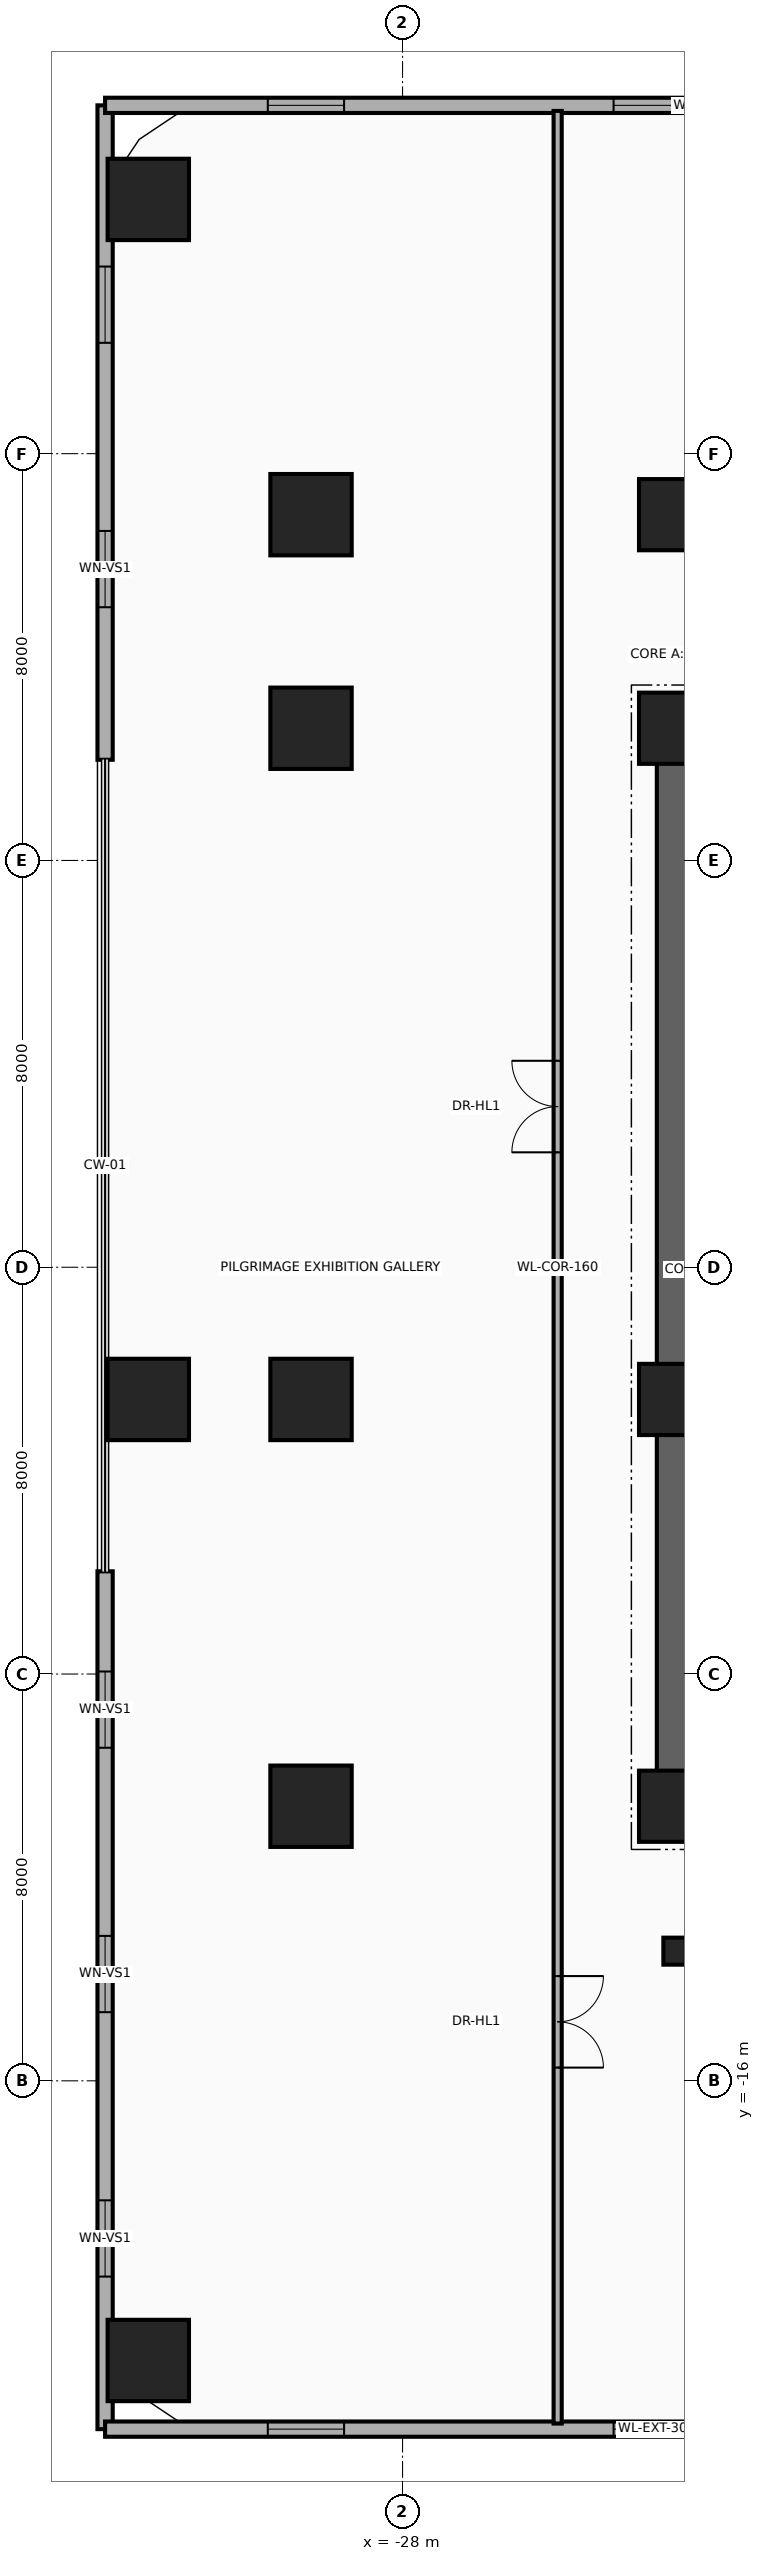
"""IFC4 building model, lengths in metres.
Left out: names, types, materials, properties, quantities, classifications, styles, units other than length and angle.
Written with IfcOpenShell. Run it as: python <this file> out.ifc"""

import sys

from ifc_helpers import new_model, si_unit, direction, frame, frame_2d, origin, origin_2d, place, context, subcontext, project, spatial, rectangle, i_section, extrude, source, transform, mapped, element, fill, save


model = new_model("IFC4")
c1 = context("Model", 3, precision=1e-05, world=origin(), true_north=direction((0.0, 1.0)))
c2 = subcontext(c1, "Body", "Model", "MODEL_VIEW")
j1 = project(units=[si_unit("LENGTHUNIT", "METRE"), si_unit("PLANEANGLEUNIT", "RADIAN")], contexts=[c1])
p1 = place(None, origin())
s1 = spatial("IfcSite", under=j1, at=p1, CompositionType="ELEMENT")
p2 = place(p1, origin())
s2 = spatial("IfcBuilding", under=s1, at=p2, CompositionType="ELEMENT")
p3 = place(p2, frame((0.0, 0.0, 15.6)))
s3 = spatial("IfcBuildingStorey", under=s2, at=p3, CompositionType="ELEMENT", Elevation=15.6)
p4 = place(p3, frame((-22.65, -11.15, 0.0), z_axis=(0.0, 0.0, 1.0), x_axis=(0.0, 1.0, 0.0)))
e1 = element("IfcWall", 1, at=p4, inside=s3, PredefinedType="SHEAR", context=c2, shape_type="SweptSolid", body=[
    extrude(rectangle(XDim=22.3, YDim=0.7, at=frame_2d((11.15, 0.0))), origin(), (0.0, 0.0, 1.0), 4.8),
])
for number, where, z_axis, x_axis in (
    (2, (-22.65, 10.8, 0.0), (0.0, 0.0, 1.0), (1.0, 0.0, 0.0)),
    (3, (-22.65, -10.8, 0.0), (0.0, 0.0, 1.0), (1.0, 0.0, 0.0)),
):
    element("IfcWall", number, at=place(p3, frame(where, z_axis=z_axis, x_axis=x_axis)), inside=s3, PredefinedType="SHEAR", context=c2, shape_type="SweptSolid", body=[
        extrude(rectangle(XDim=10.25, YDim=0.7, at=frame_2d((5.125, 0.0))), origin(), (0.0, 0.0, 1.0), 4.8),
    ])
m1 = source(origin(), c2, "Body", "SweptSolid", [
    extrude(rectangle(XDim=1.6, YDim=1.6, at=origin_2d()), origin(), (0.0, 0.0, 1.0), 5.2),
])
p5 = place(p3, frame((-29.8, -10.6, 0.0), z_axis=(0.0, 0.0, 1.0), x_axis=(1.0, 0.0, 0.0)))
e4 = element("IfcColumn", 4, at=p5, inside=s3, PredefinedType="COLUMN", context=c2, shape_type="MappedRepresentation", body=[
    mapped(m1, transform((0.0, 0.0, 0.0), x_axis=(1.0, 0.0, 0.0), y_axis=(0.0, 1.0, 0.0), z_axis=(0.0, 0.0, 1.0), scale=1.0)),
])
m2 = source(origin(), c2, "Body", "SweptSolid", [
    extrude(rectangle(XDim=1.4, YDim=1.4, at=origin_2d()), origin(), (0.0, 0.0, 1.0), 5.2),
])
p6 = place(p3, frame((-22.65, -10.6, 0.0), z_axis=(0.0, 0.0, 1.0), x_axis=(1.0, 0.0, 0.0)))
e5 = element("IfcColumn", 5, at=p6, inside=s3, PredefinedType="COLUMN", context=c2, shape_type="MappedRepresentation", body=[
    mapped(m2, transform((0.0, 0.0, 0.0), x_axis=(1.0, 0.0, 0.0), y_axis=(0.0, 1.0, 0.0), z_axis=(0.0, 0.0, 1.0), scale=1.0)),
])
p7 = place(p3, frame((-29.8, -2.6, 0.0), z_axis=(0.0, 0.0, 1.0), x_axis=(1.0, 0.0, 0.0)))
e6 = element("IfcColumn", 6, at=p7, inside=s3, PredefinedType="COLUMN", context=c2, shape_type="MappedRepresentation", body=[
    mapped(m1, transform((0.0, 0.0, 0.0), x_axis=(1.0, 0.0, 0.0), y_axis=(0.0, 1.0, 0.0), z_axis=(0.0, 0.0, 1.0), scale=1.0)),
])
p8 = place(p3, frame((-22.65, -2.6, 0.0), z_axis=(0.0, 0.0, 1.0), x_axis=(1.0, 0.0, 0.0)))
e7 = element("IfcColumn", 7, at=p8, inside=s3, PredefinedType="COLUMN", context=c2, shape_type="MappedRepresentation", body=[
    mapped(m2, transform((0.0, 0.0, 0.0), x_axis=(1.0, 0.0, 0.0), y_axis=(0.0, 1.0, 0.0), z_axis=(0.0, 0.0, 1.0), scale=1.0)),
])
p9 = place(p3, frame((-29.8, 10.6, 0.0), z_axis=(0.0, 0.0, 1.0), x_axis=(1.0, 0.0, 0.0)))
e8 = element("IfcColumn", 8, at=p9, inside=s3, PredefinedType="COLUMN", context=c2, shape_type="MappedRepresentation", body=[
    mapped(m1, transform((0.0, 0.0, 0.0), x_axis=(1.0, 0.0, 0.0), y_axis=(0.0, 1.0, 0.0), z_axis=(0.0, 0.0, 1.0), scale=1.0)),
])
p10 = place(p3, frame((-22.65, 10.6, 0.0), z_axis=(0.0, 0.0, 1.0), x_axis=(1.0, 0.0, 0.0)))
e9 = element("IfcColumn", 9, at=p10, inside=s3, PredefinedType="COLUMN", context=c2, shape_type="MappedRepresentation", body=[
    mapped(m2, transform((0.0, 0.0, 0.0), x_axis=(1.0, 0.0, 0.0), y_axis=(0.0, 1.0, 0.0), z_axis=(0.0, 0.0, 1.0), scale=1.0)),
])
p11 = place(p3, frame((-29.8, 14.8, 0.0), z_axis=(0.0, 0.0, 1.0), x_axis=(1.0, 0.0, 0.0)))
e10 = element("IfcColumn", 10, at=p11, inside=s3, PredefinedType="COLUMN", context=c2, shape_type="MappedRepresentation", body=[
    mapped(m1, transform((0.0, 0.0, 0.0), x_axis=(1.0, 0.0, 0.0), y_axis=(0.0, 1.0, 0.0), z_axis=(0.0, 0.0, 1.0), scale=1.0)),
])
p12 = place(p3, frame((-22.65, 14.8, 0.0), z_axis=(0.0, 0.0, 1.0), x_axis=(1.0, 0.0, 0.0)))
e11 = element("IfcColumn", 11, at=p12, inside=s3, PredefinedType="COLUMN", context=c2, shape_type="MappedRepresentation", body=[
    mapped(m2, transform((0.0, 0.0, 0.0), x_axis=(1.0, 0.0, 0.0), y_axis=(0.0, 1.0, 0.0), z_axis=(0.0, 0.0, 1.0), scale=1.0)),
])
m3 = source(origin(), c2, "Body", "SweptSolid", [
    extrude(i_section(OverallWidth=0.442, OverallDepth=0.531, WebThickness=0.066, FlangeThickness=0.106, at=origin_2d()), origin(), (0.0, 0.0, 1.0), 5.2),
])
p13 = place(p3, frame((-22.65, -13.45, 0.0), z_axis=(0.0, 0.0, 1.0), x_axis=(1.0, 0.0, 0.0)))
e12 = element("IfcColumn", 12, at=p13, inside=s3, PredefinedType="COLUMN", context=c2, shape_type="MappedRepresentation", body=[
    mapped(m3, transform((0.0, 0.0, 0.0), x_axis=(1.0, 0.0, 0.0), y_axis=(0.0, 1.0, 0.0), z_axis=(0.0, 0.0, 1.0), scale=1.0)),
])
for number, where, z_axis, x_axis in (
    (13, (-33.0, -21.5, 0.0), (0.0, 0.0, 1.0), (1.0, 0.0, 0.0)),
    (14, (-33.0, -2.6, 0.0), (0.0, 0.0, 1.0), (1.0, 0.0, 0.0)),
    (15, (-33.0, 21.0, 0.0), (0.0, 0.0, 1.0), (1.0, 0.0, 0.0)),
):
    element("IfcColumn", number, at=place(p3, frame(where, z_axis=z_axis, x_axis=x_axis)), inside=s3, PredefinedType="COLUMN", context=c2, shape_type="MappedRepresentation", body=[
        mapped(m1, transform((0.0, 0.0, 0.0), x_axis=(1.0, 0.0, 0.0), y_axis=(0.0, 1.0, 0.0), z_axis=(0.0, 0.0, 1.0), scale=1.0)),
    ])
p14 = place(p3, frame((-33.85, -22.85, 0.0), z_axis=(0.0, 0.0, 1.0), x_axis=(0.0, 1.0, 0.0)))
e16 = element("IfcWall", 16, at=p14, inside=s3, PredefinedType="SOLIDWALL", context=c2, shape_type="SweptSolid", body=[
    extrude(rectangle(XDim=16.87, YDim=0.3, at=frame_2d((8.435, 0.0))), origin(), (0.0, 0.0, 1.0), 4.8),
])
p15 = place(p14, frame((3.0, 0.0, 0.9)))
e17 = element("IfcOpeningElement", 17, at=p15, cuts=e16, PredefinedType="OPENING", context=c2, shape_type="SweptSolid", body=[
    extrude(rectangle(XDim=1.5, YDim=1.75, at=frame_2d((0.75, 0.875))), frame((0.0, 0.165, 0.0), z_axis=(0.0, -1.0, 0.0), x_axis=(1.0, 0.0, 0.0)), (0.0, 0.0, 1.0), 0.33),
])
p16 = place(p14, frame((8.2, 0.0, 0.9)))
e18 = element("IfcOpeningElement", 18, at=p16, cuts=e16, PredefinedType="OPENING", context=c2, shape_type="SweptSolid", body=[
    extrude(rectangle(XDim=1.5, YDim=1.75, at=frame_2d((0.75, 0.875))), frame((0.0, 0.165, 0.0), z_axis=(0.0, -1.0, 0.0), x_axis=(1.0, 0.0, 0.0)), (0.0, 0.0, 1.0), 0.33),
])
p17 = place(p14, frame((13.4, 0.0, 0.9)))
e19 = element("IfcOpeningElement", 19, at=p17, cuts=e16, PredefinedType="OPENING", context=c2, shape_type="SweptSolid", body=[
    extrude(rectangle(XDim=1.5, YDim=1.75, at=frame_2d((0.75, 0.875))), frame((0.0, 0.165, 0.0), z_axis=(0.0, -1.0, 0.0), x_axis=(1.0, 0.0, 0.0)), (0.0, 0.0, 1.0), 0.33),
])
p18 = place(p3, frame((-33.85, 9.98, 0.0), z_axis=(0.0, 0.0, 1.0), x_axis=(0.0, 1.0, 0.0)))
e20 = element("IfcWall", 20, at=p18, inside=s3, PredefinedType="SOLIDWALL", context=c2, shape_type="SweptSolid", body=[
    extrude(rectangle(XDim=12.87, YDim=0.3, at=frame_2d((6.435, 0.0))), origin(), (0.0, 0.0, 1.0), 4.8),
])
p19 = place(p18, frame((3.0, 0.0, 0.9)))
e21 = element("IfcOpeningElement", 21, at=p19, cuts=e20, PredefinedType="OPENING", context=c2, shape_type="SweptSolid", body=[
    extrude(rectangle(XDim=1.5, YDim=1.75, at=frame_2d((0.75, 0.875))), frame((0.0, 0.165, 0.0), z_axis=(0.0, -1.0, 0.0), x_axis=(1.0, 0.0, 0.0)), (0.0, 0.0, 1.0), 0.33),
])
p20 = place(p18, frame((8.2, 0.0, 0.9)))
e22 = element("IfcOpeningElement", 22, at=p20, cuts=e20, PredefinedType="OPENING", context=c2, shape_type="SweptSolid", body=[
    extrude(rectangle(XDim=1.5, YDim=1.75, at=frame_2d((0.75, 0.875))), frame((0.0, 0.165, 0.0), z_axis=(0.0, -1.0, 0.0), x_axis=(1.0, 0.0, 0.0)), (0.0, 0.0, 1.0), 0.33),
])
p21 = place(p3, frame((-33.85, -22.85, 0.0), z_axis=(0.0, 0.0, 1.0), x_axis=(1.0, 0.0, 0.0)))
e23 = element("IfcWall", 23, at=p21, inside=s3, PredefinedType="SOLIDWALL", context=c2, shape_type="SweptSolid", body=[
    extrude(rectangle(XDim=21.7, YDim=0.3, at=frame_2d((10.85, 0.0))), origin(), (0.0, 0.0, 1.0), 4.8),
])
p22 = place(p21, frame((3.2, 0.0, 0.9)))
e24 = element("IfcOpeningElement", 24, at=p22, cuts=e23, PredefinedType="OPENING", context=c2, shape_type="SweptSolid", body=[
    extrude(rectangle(XDim=1.5, YDim=1.75, at=frame_2d((0.75, 0.875))), frame((0.0, 0.165, 0.0), z_axis=(0.0, -1.0, 0.0), x_axis=(1.0, 0.0, 0.0)), (0.0, 0.0, 1.0), 0.33),
])
p23 = place(p21, frame((10.0, 0.0, 0.9)))
e25 = element("IfcOpeningElement", 25, at=p23, cuts=e23, PredefinedType="OPENING", context=c2, shape_type="SweptSolid", body=[
    extrude(rectangle(XDim=1.5, YDim=1.75, at=frame_2d((0.75, 0.875))), frame((0.0, 0.165, 0.0), z_axis=(0.0, -1.0, 0.0), x_axis=(1.0, 0.0, 0.0)), (0.0, 0.0, 1.0), 0.33),
])
p24 = place(p21, frame((17.8, 0.0, 0.9)))
e26 = element("IfcOpeningElement", 26, at=p24, cuts=e23, PredefinedType="OPENING", context=c2, shape_type="SweptSolid", body=[
    extrude(rectangle(XDim=1.5, YDim=1.75, at=frame_2d((0.75, 0.875))), frame((0.0, 0.165, 0.0), z_axis=(0.0, -1.0, 0.0), x_axis=(1.0, 0.0, 0.0)), (0.0, 0.0, 1.0), 0.33),
])
p25 = place(p3, frame((-33.85, 22.85, 0.0), z_axis=(0.0, 0.0, 1.0), x_axis=(1.0, 0.0, 0.0)))
e27 = element("IfcWall", 27, at=p25, inside=s3, PredefinedType="SOLIDWALL", context=c2, shape_type="SweptSolid", body=[
    extrude(rectangle(XDim=23.87, YDim=0.3, at=frame_2d((11.935, 0.0))), origin(), (0.0, 0.0, 1.0), 4.8),
])
p26 = place(p25, frame((3.2, 0.0, 0.9)))
e28 = element("IfcOpeningElement", 28, at=p26, cuts=e27, PredefinedType="OPENING", context=c2, shape_type="SweptSolid", body=[
    extrude(rectangle(XDim=1.5, YDim=1.75, at=frame_2d((0.75, 0.875))), frame((0.0, 0.165, 0.0), z_axis=(0.0, -1.0, 0.0), x_axis=(1.0, 0.0, 0.0)), (0.0, 0.0, 1.0), 0.33),
])
p27 = place(p25, frame((10.0, 0.0, 0.9)))
e29 = element("IfcOpeningElement", 29, at=p27, cuts=e27, PredefinedType="OPENING", context=c2, shape_type="SweptSolid", body=[
    extrude(rectangle(XDim=1.5, YDim=1.75, at=frame_2d((0.75, 0.875))), frame((0.0, 0.165, 0.0), z_axis=(0.0, -1.0, 0.0), x_axis=(1.0, 0.0, 0.0)), (0.0, 0.0, 1.0), 0.33),
])
p28 = place(p25, frame((17.8, 0.0, 0.9)))
e30 = element("IfcOpeningElement", 30, at=p28, cuts=e27, PredefinedType="OPENING", context=c2, shape_type="SweptSolid", body=[
    extrude(rectangle(XDim=1.5, YDim=1.75, at=frame_2d((0.75, 0.875))), frame((0.0, 0.165, 0.0), z_axis=(0.0, -1.0, 0.0), x_axis=(1.0, 0.0, 0.0)), (0.0, 0.0, 1.0), 0.33),
])
p29 = place(p3, frame((-24.95, -22.74, 0.0), z_axis=(0.0, 0.0, 1.0), x_axis=(0.0, 1.0, 0.0)))
e31 = element("IfcWall", 31, at=p29, inside=s3, PredefinedType="PARTITIONING", context=c2, shape_type="SweptSolid", body=[
    extrude(rectangle(XDim=45.48, YDim=0.16, at=frame_2d((22.74, 0.0))), origin(), (0.0, 0.0, 1.0), 3.585),
])
p30 = place(p29, frame((7.0, 0.0, 0.0)))
e32 = element("IfcOpeningElement", 32, at=p30, cuts=e31, PredefinedType="OPENING", context=c2, shape_type="SweptSolid", body=[
    extrude(rectangle(XDim=1.8, YDim=2.15, at=frame_2d((0.9, 1.075))), frame((0.0, 0.095, 0.0), z_axis=(0.0, -1.0, 0.0), x_axis=(1.0, 0.0, 0.0)), (0.0, 0.0, 1.0), 0.19),
])
p31 = place(p29, frame((25.0, 0.0, 0.0)))
e33 = element("IfcOpeningElement", 33, at=p31, cuts=e31, PredefinedType="OPENING", context=c2, shape_type="SweptSolid", body=[
    extrude(rectangle(XDim=1.8, YDim=2.15, at=frame_2d((0.9, 1.075))), frame((0.0, 0.095, 0.0), z_axis=(0.0, -1.0, 0.0), x_axis=(1.0, 0.0, 0.0)), (0.0, 0.0, 1.0), 0.19),
])
p32 = place(p15, origin())
e34 = element("IfcWindow", 34, at=p32, inside=s3, PartitioningType="SINGLE_PANEL", PredefinedType="WINDOW", context=c2, shape_type="SweptSolid", body=[
    extrude(rectangle(XDim=1.5, YDim=1.75, at=frame_2d((0.75, 0.875))), frame((0.0, 0.03, 0.0), z_axis=(0.0, -1.0, 0.0), x_axis=(1.0, 0.0, 0.0)), (0.0, 0.0, 1.0), 0.06),
])
fill(e17, e34)
p33 = place(p16, origin())
e35 = element("IfcWindow", 35, at=p33, inside=s3, PartitioningType="SINGLE_PANEL", PredefinedType="WINDOW", context=c2, shape_type="SweptSolid", body=[
    extrude(rectangle(XDim=1.5, YDim=1.75, at=frame_2d((0.75, 0.875))), frame((0.0, 0.03, 0.0), z_axis=(0.0, -1.0, 0.0), x_axis=(1.0, 0.0, 0.0)), (0.0, 0.0, 1.0), 0.06),
])
fill(e18, e35)
p34 = place(p17, origin())
e36 = element("IfcWindow", 36, at=p34, inside=s3, PartitioningType="SINGLE_PANEL", PredefinedType="WINDOW", context=c2, shape_type="SweptSolid", body=[
    extrude(rectangle(XDim=1.5, YDim=1.75, at=frame_2d((0.75, 0.875))), frame((0.0, 0.03, 0.0), z_axis=(0.0, -1.0, 0.0), x_axis=(1.0, 0.0, 0.0)), (0.0, 0.0, 1.0), 0.06),
])
fill(e19, e36)
p35 = place(p19, origin())
e37 = element("IfcWindow", 37, at=p35, inside=s3, PartitioningType="SINGLE_PANEL", PredefinedType="WINDOW", context=c2, shape_type="SweptSolid", body=[
    extrude(rectangle(XDim=1.5, YDim=1.75, at=frame_2d((0.75, 0.875))), frame((0.0, 0.03, 0.0), z_axis=(0.0, -1.0, 0.0), x_axis=(1.0, 0.0, 0.0)), (0.0, 0.0, 1.0), 0.06),
])
fill(e21, e37)
p36 = place(p20, origin())
e38 = element("IfcWindow", 38, at=p36, inside=s3, PartitioningType="SINGLE_PANEL", PredefinedType="WINDOW", context=c2, shape_type="SweptSolid", body=[
    extrude(rectangle(XDim=1.5, YDim=1.75, at=frame_2d((0.75, 0.875))), frame((0.0, 0.03, 0.0), z_axis=(0.0, -1.0, 0.0), x_axis=(1.0, 0.0, 0.0)), (0.0, 0.0, 1.0), 0.06),
])
fill(e22, e38)
p37 = place(p22, origin())
e39 = element("IfcWindow", 39, at=p37, inside=s3, PartitioningType="SINGLE_PANEL", PredefinedType="WINDOW", context=c2, shape_type="SweptSolid", body=[
    extrude(rectangle(XDim=1.5, YDim=1.75, at=frame_2d((0.75, 0.875))), frame((0.0, 0.03, 0.0), z_axis=(0.0, -1.0, 0.0), x_axis=(1.0, 0.0, 0.0)), (0.0, 0.0, 1.0), 0.06),
])
fill(e24, e39)
p38 = place(p23, origin())
e40 = element("IfcWindow", 40, at=p38, inside=s3, PartitioningType="SINGLE_PANEL", PredefinedType="WINDOW", context=c2, shape_type="SweptSolid", body=[
    extrude(rectangle(XDim=1.5, YDim=1.75, at=frame_2d((0.75, 0.875))), frame((0.0, 0.03, 0.0), z_axis=(0.0, -1.0, 0.0), x_axis=(1.0, 0.0, 0.0)), (0.0, 0.0, 1.0), 0.06),
])
fill(e25, e40)
p39 = place(p26, origin())
e41 = element("IfcWindow", 41, at=p39, inside=s3, PartitioningType="SINGLE_PANEL", PredefinedType="WINDOW", context=c2, shape_type="SweptSolid", body=[
    extrude(rectangle(XDim=1.5, YDim=1.75, at=frame_2d((0.75, 0.875))), frame((0.0, 0.03, 0.0), z_axis=(0.0, -1.0, 0.0), x_axis=(1.0, 0.0, 0.0)), (0.0, 0.0, 1.0), 0.06),
])
fill(e28, e41)
p40 = place(p27, origin())
e42 = element("IfcWindow", 42, at=p40, inside=s3, PartitioningType="SINGLE_PANEL", PredefinedType="WINDOW", context=c2, shape_type="SweptSolid", body=[
    extrude(rectangle(XDim=1.5, YDim=1.75, at=frame_2d((0.75, 0.875))), frame((0.0, 0.03, 0.0), z_axis=(0.0, -1.0, 0.0), x_axis=(1.0, 0.0, 0.0)), (0.0, 0.0, 1.0), 0.06),
])
fill(e29, e42)
p41 = place(p30, frame((1.8, 0.0, 0.0), z_axis=(0.0, 0.0, 1.0), x_axis=(-1.0, 0.0, 0.0)))
e43 = element("IfcDoor", 43, at=p41, inside=s3, OperationType="DOUBLE_DOOR_SINGLE_SWING", PredefinedType="DOOR", context=c2, shape_type="SweptSolid", body=[
    extrude(rectangle(XDim=1.8, YDim=2.15, at=frame_2d((0.9, 1.075))), frame((0.0, 0.025, 0.0), z_axis=(0.0, -1.0, 0.0), x_axis=(1.0, 0.0, 0.0)), (0.0, 0.0, 1.0), 0.05),
])
fill(e32, e43)
p42 = place(p31, origin())
e44 = element("IfcDoor", 44, at=p42, inside=s3, OperationType="DOUBLE_DOOR_SINGLE_SWING", PredefinedType="DOOR", context=c2, shape_type="SweptSolid", body=[
    extrude(rectangle(XDim=1.8, YDim=2.15, at=frame_2d((0.9, 1.075))), frame((0.0, 0.025, 0.0), z_axis=(0.0, -1.0, 0.0), x_axis=(1.0, 0.0, 0.0)), (0.0, 0.0, 1.0), 0.05),
])
fill(e33, e44)
save(model, sys.argv[1])
